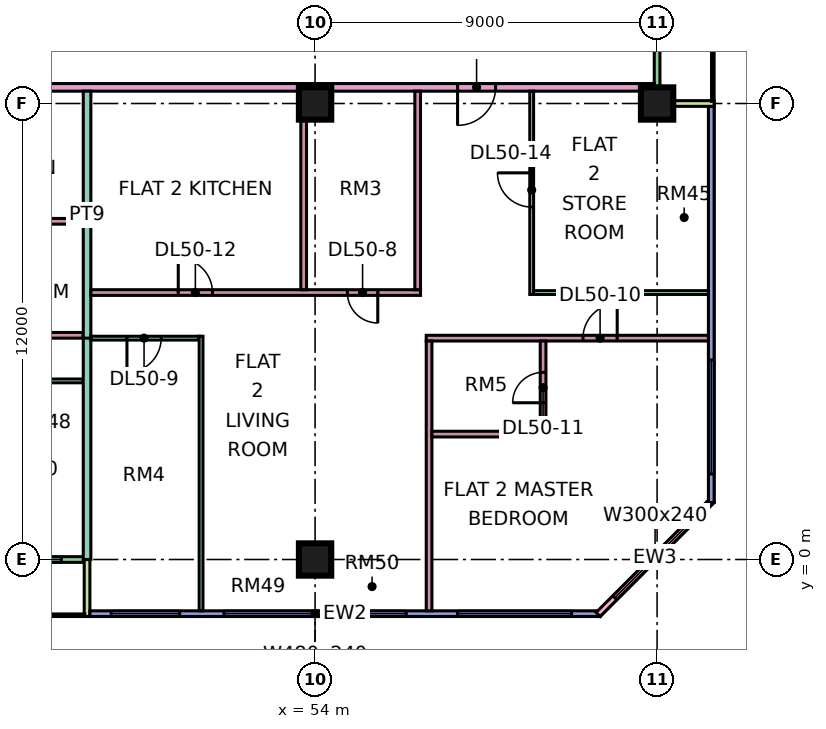
"""IFC4 building model, lengths in metres.
Left out: names, types, materials, properties, quantities, classifications, styles, units other than length and angle.
Written with IfcOpenShell. Run it as: python <this file> out.ifc"""

import sys

from ifc_helpers import new_model, si_unit, direction, frame, frame_2d, origin, origin_2d, place, context, subcontext, project, spatial, rectangle, extrude, element, fill, save


model = new_model("IFC4")
c1 = context("Model", 3, precision=1e-05, world=origin(), true_north=direction((0.0, 1.0)))
c2 = subcontext(c1, "Body", "Model", "MODEL_VIEW")
j1 = project(units=[si_unit("LENGTHUNIT", "METRE"), si_unit("PLANEANGLEUNIT", "RADIAN")], contexts=[c1])
p1 = place(None, origin())
s1 = spatial("IfcSite", under=j1, at=p1, CompositionType="ELEMENT")
p2 = place(p1, origin())
s2 = spatial("IfcBuilding", under=s1, at=p2, CompositionType="ELEMENT")
p3 = place(p2, frame((0.0, 0.0, 215.4)))
s3 = spatial("IfcBuildingStorey", under=s2, at=p3, CompositionType="ELEMENT", Elevation=215.4)
for number, where, z_axis, x_axis in (
    (1, (54.0, 0.0, 0.0), (0.0, 0.0, 1.0), (1.0, 0.0, 0.0)),
    (2, (54.0, 12.0, 0.0), (0.0, 0.0, 1.0), (1.0, 0.0, 0.0)),
    (3, (63.0, 12.0, 0.0), (0.0, 0.0, 1.0), (1.0, 0.0, 0.0)),
):
    element("IfcColumn", number, at=place(p3, frame(where, z_axis=z_axis, x_axis=x_axis)), inside=s3, PredefinedType="COLUMN", context=c2, shape_type="SweptSolid", body=[
        extrude(rectangle(XDim=0.85, YDim=0.85, at=origin_2d()), origin(), (0.0, 0.0, 1.0), 3.75),
    ])
p4 = place(p3, frame((36.075, 0.0, 0.0), z_axis=(0.0, 0.0, 1.0), x_axis=(1.0, 0.0, 0.0)))
e4 = element("IfcWall", 4, at=p4, inside=s3, PredefinedType="SOLIDWALL", context=c2, shape_type="SweptSolid", body=[
    extrude(rectangle(XDim=11.85, YDim=0.15, at=frame_2d((5.925, 0.0))), origin(), (0.0, 0.0, 1.0), 3.35),
])
p5 = place(p4, frame((3.525, 0.0, 0.0)))
e5 = element("IfcOpeningElement", 5, at=p5, cuts=e4, PredefinedType="OPENING", context=c2, shape_type="SweptSolid", body=[
    extrude(rectangle(XDim=1.8, YDim=2.4, at=frame_2d((0.9, 1.2))), frame((0.0, 0.085, 0.0), z_axis=(0.0, -1.0, 0.0), x_axis=(1.0, 0.0, 0.0)), (0.0, 0.0, 1.0), 0.17),
])
p6 = place(p4, frame((10.05, 0.0, 0.45)))
e6 = element("IfcOpeningElement", 6, at=p6, cuts=e4, PredefinedType="OPENING", context=c2, shape_type="SweptSolid", body=[
    extrude(rectangle(XDim=1.2, YDim=2.4, at=frame_2d((0.6, 1.2))), frame((0.0, 0.085, 0.0), z_axis=(0.0, -1.0, 0.0), x_axis=(1.0, 0.0, 0.0)), (0.0, 0.0, 1.0), 0.17),
])
p7 = place(p3, frame((48.0, -1.5, 0.0), z_axis=(0.0, 0.0, 1.0), x_axis=(0.0, 1.0, 0.0)))
e7 = element("IfcWall", 7, at=p7, inside=s3, PredefinedType="SOLIDWALL", context=c2, shape_type="SweptSolid", body=[
    extrude(rectangle(XDim=1.5, YDim=0.15, at=frame_2d((0.75, 0.0))), origin(), (0.0, 0.0, 1.0), 3.35),
])
p8 = place(p3, frame((48.075, -1.425, 0.0), z_axis=(0.0, 0.0, 1.0), x_axis=(1.0, 0.0, 0.0)))
e8 = element("IfcWall", 8, at=p8, inside=s3, PredefinedType="SOLIDWALL", context=c2, shape_type="SweptSolid", body=[
    extrude(rectangle(XDim=13.425, YDim=0.15, at=frame_2d((6.712, 0.0))), origin(), (0.0, 0.0, 1.0), 3.35),
])
p9 = place(p8, frame((0.562, 0.0, 0.45)))
e9 = element("IfcOpeningElement", 9, at=p9, cuts=e8, PredefinedType="OPENING", context=c2, shape_type="SweptSolid", body=[
    extrude(rectangle(XDim=1.8, YDim=2.4, at=frame_2d((0.9, 1.2))), frame((0.0, 0.085, 0.0), z_axis=(0.0, -1.0, 0.0), x_axis=(1.0, 0.0, 0.0)), (0.0, 0.0, 1.0), 0.17),
])
p10 = place(p8, frame((3.525, 0.0, 0.45)))
e10 = element("IfcOpeningElement", 10, at=p10, cuts=e8, PredefinedType="OPENING", context=c2, shape_type="SweptSolid", body=[
    extrude(rectangle(XDim=4.8, YDim=2.4, at=frame_2d((2.4, 1.2))), frame((0.0, 0.085, 0.0), z_axis=(0.0, -1.0, 0.0), x_axis=(1.0, 0.0, 0.0)), (0.0, 0.0, 1.0), 0.17),
])
p11 = place(p8, frame((9.675, 0.0, 0.45)))
e11 = element("IfcOpeningElement", 11, at=p11, cuts=e8, PredefinedType="OPENING", context=c2, shape_type="SweptSolid", body=[
    extrude(rectangle(XDim=3.0, YDim=2.4, at=frame_2d((1.5, 1.2))), frame((0.0, 0.085, 0.0), z_axis=(0.0, -1.0, 0.0), x_axis=(1.0, 0.0, 0.0)), (0.0, 0.0, 1.0), 0.17),
])
p12 = place(p3, frame((61.447, -1.447, 0.0), z_axis=(0.0, 0.0, 1.0), x_axis=(0.707106781187, 0.707106781187, 0.0)))
e12 = element("IfcWall", 12, at=p12, inside=s3, PredefinedType="SOLIDWALL", context=c2, shape_type="SweptSolid", body=[
    extrude(rectangle(XDim=4.243, YDim=0.15, at=frame_2d((2.121, 0.0))), origin(), (0.0, 0.0, 1.0), 3.35),
])
p13 = place(p12, frame((0.621, 0.0, 0.45)))
e13 = element("IfcOpeningElement", 13, at=p13, cuts=e12, PredefinedType="OPENING", context=c2, shape_type="SweptSolid", body=[
    extrude(rectangle(XDim=3.0, YDim=2.4, at=frame_2d((1.5, 1.2))), frame((0.0, 0.085, 0.0), z_axis=(0.0, -1.0, 0.0), x_axis=(1.0, 0.0, 0.0)), (0.0, 0.0, 1.0), 0.17),
])
p14 = place(p3, frame((64.425, 1.5, 0.0), z_axis=(0.0, 0.0, 1.0), x_axis=(0.0, 1.0, 0.0)))
e14 = element("IfcWall", 14, at=p14, inside=s3, PredefinedType="SOLIDWALL", context=c2, shape_type="SweptSolid", body=[
    extrude(rectangle(XDim=10.425, YDim=0.15, at=frame_2d((5.212, 0.0))), origin(), (0.0, 0.0, 1.0), 3.35),
])
p15 = place(p14, frame((0.75, 0.0, 0.45)))
e15 = element("IfcOpeningElement", 15, at=p15, cuts=e14, PredefinedType="OPENING", context=c2, shape_type="SweptSolid", body=[
    extrude(rectangle(XDim=3.0, YDim=2.4, at=frame_2d((1.5, 1.2))), frame((0.0, 0.085, 0.0), z_axis=(0.0, -1.0, 0.0), x_axis=(1.0, 0.0, 0.0)), (0.0, 0.0, 1.0), 0.17),
])
p16 = place(p3, frame((63.0, 12.075, 0.0), z_axis=(0.0, 0.0, 1.0), x_axis=(0.0, 1.0, 0.0)))
e16 = element("IfcWall", 16, at=p16, inside=s3, PredefinedType="SOLIDWALL", context=c2, shape_type="SweptSolid", body=[
    extrude(rectangle(XDim=10.35, YDim=0.15, at=frame_2d((5.175, 0.0))), origin(), (0.0, 0.0, 1.0), 3.35),
])
p17 = place(p16, frame((4.125, 0.0, 0.45)))
e17 = element("IfcOpeningElement", 17, at=p17, cuts=e16, PredefinedType="OPENING", context=c2, shape_type="SweptSolid", body=[
    extrude(rectangle(XDim=1.8, YDim=2.4, at=frame_2d((0.9, 1.2))), frame((0.0, 0.085, 0.0), z_axis=(0.0, -1.0, 0.0), x_axis=(1.0, 0.0, 0.0)), (0.0, 0.0, 1.0), 0.17),
])
p18 = place(p16, frame((7.538, 0.0, 0.0)))
e18 = element("IfcOpeningElement", 18, at=p18, cuts=e16, PredefinedType="OPENING", context=c2, shape_type="SweptSolid", body=[
    extrude(rectangle(XDim=1.8, YDim=2.4, at=frame_2d((0.9, 1.2))), frame((0.0, 0.085, 0.0), z_axis=(0.0, -1.0, 0.0), x_axis=(1.0, 0.0, 0.0)), (0.0, 0.0, 1.0), 0.17),
])
p19 = place(p3, frame((64.5, 12.0, 0.0), z_axis=(0.0, 0.0, 1.0), x_axis=(-1.0, 0.0, 0.0)))
e19 = element("IfcWall", 19, at=p19, inside=s3, PredefinedType="SOLIDWALL", context=c2, shape_type="SweptSolid", body=[
    extrude(rectangle(XDim=1.5, YDim=0.15, at=frame_2d((0.75, 0.0))), origin(), (0.0, 0.0, 1.0), 3.35),
])
p20 = place(p3, frame((33.05, 4.7, 0.0), z_axis=(0.0, 0.0, 1.0), x_axis=(1.0, 0.0, 0.0)))
e20 = element("IfcWall", 20, at=p20, inside=s3, PredefinedType="PARTITIONING", context=c2, shape_type="SweptSolid", body=[
    extrude(rectangle(XDim=14.85, YDim=0.1, at=frame_2d((7.425, 0.0))), origin(), (0.0, 0.0, 1.0), 3.35),
])
p21 = place(p20, frame((1.0, 0.0, 0.0)))
e21 = element("IfcOpeningElement", 21, at=p21, cuts=e20, PredefinedType="OPENING", context=c2, shape_type="SweptSolid", body=[
    extrude(rectangle(XDim=0.9, YDim=2.1, at=frame_2d((0.45, 1.05))), frame((0.0, 0.06, 0.0), z_axis=(0.0, -1.0, 0.0), x_axis=(1.0, 0.0, 0.0)), (0.0, 0.0, 1.0), 0.12),
])
p22 = place(p20, frame((13.0, 0.0, 0.0)))
e22 = element("IfcOpeningElement", 22, at=p22, cuts=e20, PredefinedType="OPENING", context=c2, shape_type="SweptSolid", body=[
    extrude(rectangle(XDim=0.9, YDim=2.1, at=frame_2d((0.45, 1.05))), frame((0.0, 0.06, 0.0), z_axis=(0.0, -1.0, 0.0), x_axis=(1.0, 0.0, 0.0)), (0.0, 0.0, 1.0), 0.12),
])
p23 = place(p20, frame((7.0, 0.0, 0.0)))
e23 = element("IfcOpeningElement", 23, at=p23, cuts=e20, PredefinedType="OPENING", context=c2, shape_type="SweptSolid", body=[
    extrude(rectangle(XDim=0.9, YDim=2.1, at=frame_2d((0.45, 1.05))), frame((0.0, 0.06, 0.0), z_axis=(0.0, -1.0, 0.0), x_axis=(1.0, 0.0, 0.0)), (0.0, 0.0, 1.0), 0.12),
])
p24 = place(p3, frame((40.65, 12.425, 0.0), z_axis=(0.0, 0.0, 1.0), x_axis=(1.0, 0.0, 0.0)))
e24 = element("IfcWall", 24, at=p24, inside=s3, PredefinedType="PARTITIONING", context=c2, shape_type="SweptSolid", body=[
    extrude(rectangle(XDim=22.276, YDim=0.2, at=frame_2d((11.138, 0.0))), origin(), (0.0, 0.0, 1.0), 3.35),
])
p25 = place(p24, frame((17.1, 0.0, 0.0)))
e25 = element("IfcOpeningElement", 25, at=p25, cuts=e24, PredefinedType="OPENING", context=c2, shape_type="SweptSolid", body=[
    extrude(rectangle(XDim=1.0, YDim=2.1, at=frame_2d((0.5, 1.05))), frame((0.0, 0.11, 0.0), z_axis=(0.0, -1.0, 0.0), x_axis=(1.0, 0.0, 0.0)), (0.0, 0.0, 1.0), 0.22),
])
p26 = place(p24, frame((1.05, 0.0, 0.0)))
e26 = element("IfcOpeningElement", 26, at=p26, cuts=e24, PredefinedType="OPENING", context=c2, shape_type="SweptSolid", body=[
    extrude(rectangle(XDim=1.0, YDim=2.1, at=frame_2d((0.5, 1.05))), frame((0.0, 0.11, 0.0), z_axis=(0.0, -1.0, 0.0), x_axis=(1.0, 0.0, 0.0)), (0.0, 0.0, 1.0), 0.22),
])
p27 = place(p3, frame((43.725, 5.9, 0.0), z_axis=(0.0, 0.0, 1.0), x_axis=(1.0, 0.0, 0.0)))
e27 = element("IfcWall", 27, at=p27, inside=s3, PredefinedType="PARTITIONING", context=c2, shape_type="SweptSolid", body=[
    extrude(rectangle(XDim=4.175, YDim=0.15, at=frame_2d((2.087, 0.0))), origin(), (0.0, 0.0, 1.0), 3.35),
])
p28 = place(p27, frame((1.675, 0.0, 0.0)))
e28 = element("IfcOpeningElement", 28, at=p28, cuts=e27, PredefinedType="OPENING", context=c2, shape_type="SweptSolid", body=[
    extrude(rectangle(XDim=0.8, YDim=2.1, at=frame_2d((0.4, 1.05))), frame((0.0, 0.085, 0.0), z_axis=(0.0, -1.0, 0.0), x_axis=(1.0, 0.0, 0.0)), (0.0, 0.0, 1.0), 0.17),
])
p29 = place(p3, frame((43.725, 8.9, 0.0), z_axis=(0.0, 0.0, 1.0), x_axis=(1.0, 0.0, 0.0)))
e29 = element("IfcWall", 29, at=p29, inside=s3, PredefinedType="PARTITIONING", context=c2, shape_type="SweptSolid", body=[
    extrude(rectangle(XDim=4.175, YDim=0.15, at=frame_2d((2.087, 0.0))), origin(), (0.0, 0.0, 1.0), 3.35),
])
p30 = place(p3, frame((48.0, 0.0, 0.0), z_axis=(0.0, 0.0, 1.0), x_axis=(0.0, 1.0, 0.0)))
e30 = element("IfcWall", 30, at=p30, inside=s3, PredefinedType="PARTITIONING", context=c2, shape_type="SweptSolid", body=[
    extrude(rectangle(XDim=5.875, YDim=0.2, at=frame_2d((2.938, 0.0))), origin(), (0.0, 0.0, 1.0), 3.35),
])
p31 = place(p3, frame((48.0, 5.825, 0.0), z_axis=(0.0, 0.0, 1.0), x_axis=(0.0, 1.0, 0.0)))
e31 = element("IfcWall", 31, at=p31, inside=s3, PredefinedType="PARTITIONING", context=c2, shape_type="SweptSolid", body=[
    extrude(rectangle(XDim=6.5, YDim=0.2, at=frame_2d((3.25, 0.0))), origin(), (0.0, 0.0, 1.0), 3.35),
])
p32 = place(p3, frame((48.1, 5.825, 0.0), z_axis=(0.0, 0.0, 1.0), x_axis=(1.0, 0.0, 0.0)))
e32 = element("IfcWall", 32, at=p32, inside=s3, PredefinedType="PARTITIONING", context=c2, shape_type="SweptSolid", body=[
    extrude(rectangle(XDim=2.85, YDim=0.1, at=frame_2d((1.425, 0.0))), origin(), (0.0, 0.0, 1.0), 3.35),
])
p33 = place(p32, frame((0.95, 0.0, 0.0)))
e33 = element("IfcOpeningElement", 33, at=p33, cuts=e32, PredefinedType="OPENING", context=c2, shape_type="SweptSolid", body=[
    extrude(rectangle(XDim=0.9, YDim=2.1, at=frame_2d((0.45, 1.05))), frame((0.0, 0.06, 0.0), z_axis=(0.0, -1.0, 0.0), x_axis=(1.0, 0.0, 0.0)), (0.0, 0.0, 1.0), 0.12),
])
p34 = place(p3, frame((48.1, 7.025, 0.0), z_axis=(0.0, 0.0, 1.0), x_axis=(1.0, 0.0, 0.0)))
e34 = element("IfcWall", 34, at=p34, inside=s3, PredefinedType="PARTITIONING", context=c2, shape_type="SweptSolid", body=[
    extrude(rectangle(XDim=8.675, YDim=0.15, at=frame_2d((4.337, 0.0))), origin(), (0.0, 0.0, 1.0), 3.35),
])
p35 = place(p34, frame((6.75, 0.0, 0.0)))
e35 = element("IfcOpeningElement", 35, at=p35, cuts=e34, PredefinedType="OPENING", context=c2, shape_type="SweptSolid", body=[
    extrude(rectangle(XDim=0.8, YDim=2.1, at=frame_2d((0.4, 1.05))), frame((0.0, 0.085, 0.0), z_axis=(0.0, -1.0, 0.0), x_axis=(1.0, 0.0, 0.0)), (0.0, 0.0, 1.0), 0.17),
])
p36 = place(p34, frame((2.3, 0.0, 0.0)))
e36 = element("IfcOpeningElement", 36, at=p36, cuts=e34, PredefinedType="OPENING", context=c2, shape_type="SweptSolid", body=[
    extrude(rectangle(XDim=0.9, YDim=2.1, at=frame_2d((0.45, 1.05))), frame((0.0, 0.085, 0.0), z_axis=(0.0, -1.0, 0.0), x_axis=(1.0, 0.0, 0.0)), (0.0, 0.0, 1.0), 0.17),
])
p37 = place(p3, frame((51.0, -1.35, 0.0), z_axis=(0.0, 0.0, 1.0), x_axis=(0.0, 1.0, 0.0)))
e37 = element("IfcWall", 37, at=p37, inside=s3, PredefinedType="PARTITIONING", context=c2, shape_type="SweptSolid", body=[
    extrude(rectangle(XDim=7.225, YDim=0.1, at=frame_2d((3.613, 0.0))), origin(), (0.0, 0.0, 1.0), 3.35),
])
for number, where, z_axis, x_axis in (
    (38, (53.7, 7.1, 0.0), (0.0, 0.0, 1.0), (0.0, 1.0, 0.0)),
    (39, (56.7, 7.1, 0.0), (0.0, 0.0, 1.0), (0.0, 1.0, 0.0)),
):
    element("IfcWall", number, at=place(p3, frame(where, z_axis=z_axis, x_axis=x_axis)), inside=s3, PredefinedType="PARTITIONING", context=c2, shape_type="SweptSolid", body=[
        extrude(rectangle(XDim=5.225, YDim=0.15, at=frame_2d((2.612, 0.0))), origin(), (0.0, 0.0, 1.0), 3.35),
    ])
p38 = place(p3, frame((56.925, 5.825, 0.0), z_axis=(0.0, 0.0, 1.0), x_axis=(1.0, 0.0, 0.0)))
e40 = element("IfcWall", 40, at=p38, inside=s3, PredefinedType="PARTITIONING", context=c2, shape_type="SweptSolid", body=[
    extrude(rectangle(XDim=7.425, YDim=0.15, at=frame_2d((3.712, 0.0))), origin(), (0.0, 0.0, 1.0), 3.35),
])
p39 = place(p38, frame((4.125, 0.0, 0.0)))
e41 = element("IfcOpeningElement", 41, at=p39, cuts=e40, PredefinedType="OPENING", context=c2, shape_type="SweptSolid", body=[
    extrude(rectangle(XDim=0.9, YDim=2.1, at=frame_2d((0.45, 1.05))), frame((0.0, 0.085, 0.0), z_axis=(0.0, -1.0, 0.0), x_axis=(1.0, 0.0, 0.0)), (0.0, 0.0, 1.0), 0.17),
])
p40 = place(p3, frame((57.0, -1.35, 0.0), z_axis=(0.0, 0.0, 1.0), x_axis=(0.0, 1.0, 0.0)))
e42 = element("IfcWall", 42, at=p40, inside=s3, PredefinedType="PARTITIONING", context=c2, shape_type="SweptSolid", body=[
    extrude(rectangle(XDim=7.1, YDim=0.15, at=frame_2d((3.55, 0.0))), origin(), (0.0, 0.0, 1.0), 3.35),
])
p41 = place(p3, frame((57.075, 3.3, 0.0), z_axis=(0.0, 0.0, 1.0), x_axis=(1.0, 0.0, 0.0)))
e43 = element("IfcWall", 43, at=p41, inside=s3, PredefinedType="PARTITIONING", context=c2, shape_type="SweptSolid", body=[
    extrude(rectangle(XDim=3.0, YDim=0.15, at=frame_2d((1.5, 0.0))), origin(), (0.0, 0.0, 1.0), 3.35),
])
p42 = place(p3, frame((59.7, 6.975, 0.0), z_axis=(0.0, 0.0, 1.0), x_axis=(0.0, 1.0, 0.0)))
e44 = element("IfcWall", 44, at=p42, inside=s3, PredefinedType="PARTITIONING", context=c2, shape_type="SweptSolid", body=[
    extrude(rectangle(XDim=5.35, YDim=0.1, at=frame_2d((2.675, 0.0))), origin(), (0.0, 0.0, 1.0), 3.35),
])
p43 = place(p42, frame((2.3, 0.0, 0.0)))
e45 = element("IfcOpeningElement", 45, at=p43, cuts=e44, PredefinedType="OPENING", context=c2, shape_type="SweptSolid", body=[
    extrude(rectangle(XDim=0.9, YDim=2.1, at=frame_2d((0.45, 1.05))), frame((0.0, 0.06, 0.0), z_axis=(0.0, -1.0, 0.0), x_axis=(1.0, 0.0, 0.0)), (0.0, 0.0, 1.0), 0.12),
])
p44 = place(p3, frame((59.75, 7.025, 0.0), z_axis=(0.0, 0.0, 1.0), x_axis=(1.0, 0.0, 0.0)))
e46 = element("IfcWall", 46, at=p44, inside=s3, PredefinedType="PARTITIONING", context=c2, shape_type="SweptSolid", body=[
    extrude(rectangle(XDim=4.6, YDim=0.1, at=frame_2d((2.3, 0.0))), origin(), (0.0, 0.0, 1.0), 3.35),
])
p45 = place(p3, frame((60.0, 3.375, 0.0), z_axis=(0.0, 0.0, 1.0), x_axis=(0.0, 1.0, 0.0)))
e47 = element("IfcWall", 47, at=p45, inside=s3, PredefinedType="PARTITIONING", context=c2, shape_type="SweptSolid", body=[
    extrude(rectangle(XDim=2.375, YDim=0.15, at=frame_2d((1.188, 0.0))), origin(), (0.0, 0.0, 1.0), 3.35),
])
p46 = place(p45, frame((0.75, 0.0, 0.0)))
e48 = element("IfcOpeningElement", 48, at=p46, cuts=e47, PredefinedType="OPENING", context=c2, shape_type="SweptSolid", body=[
    extrude(rectangle(XDim=0.8, YDim=2.1, at=frame_2d((0.4, 1.05))), frame((0.0, 0.085, 0.0), z_axis=(0.0, -1.0, 0.0), x_axis=(1.0, 0.0, 0.0)), (0.0, 0.0, 1.0), 0.17),
])
p47 = place(p6, origin())
e49 = element("IfcWindow", 49, at=p47, inside=s3, PartitioningType="SINGLE_PANEL", PredefinedType="WINDOW", context=c2, shape_type="SweptSolid", body=[
    extrude(rectangle(XDim=1.2, YDim=2.4, at=frame_2d((0.6, 1.2))), frame((0.0, 0.03, 0.0), z_axis=(0.0, -1.0, 0.0), x_axis=(1.0, 0.0, 0.0)), (0.0, 0.0, 1.0), 0.06),
])
fill(e6, e49)
p48 = place(p9, origin())
e50 = element("IfcWindow", 50, at=p48, inside=s3, PartitioningType="SINGLE_PANEL", PredefinedType="WINDOW", context=c2, shape_type="SweptSolid", body=[
    extrude(rectangle(XDim=1.8, YDim=2.4, at=frame_2d((0.9, 1.2))), frame((0.0, 0.03, 0.0), z_axis=(0.0, -1.0, 0.0), x_axis=(1.0, 0.0, 0.0)), (0.0, 0.0, 1.0), 0.06),
])
fill(e9, e50)
p49 = place(p10, origin())
e51 = element("IfcWindow", 51, at=p49, inside=s3, PartitioningType="SINGLE_PANEL", PredefinedType="WINDOW", context=c2, shape_type="SweptSolid", body=[
    extrude(rectangle(XDim=4.8, YDim=2.4, at=frame_2d((2.4, 1.2))), frame((0.0, 0.03, 0.0), z_axis=(0.0, -1.0, 0.0), x_axis=(1.0, 0.0, 0.0)), (0.0, 0.0, 1.0), 0.06),
])
fill(e10, e51)
p50 = place(p11, origin())
e52 = element("IfcWindow", 52, at=p50, inside=s3, PartitioningType="SINGLE_PANEL", PredefinedType="WINDOW", context=c2, shape_type="SweptSolid", body=[
    extrude(rectangle(XDim=3.0, YDim=2.4, at=frame_2d((1.5, 1.2))), frame((0.0, 0.03, 0.0), z_axis=(0.0, -1.0, 0.0), x_axis=(1.0, 0.0, 0.0)), (0.0, 0.0, 1.0), 0.06),
])
fill(e11, e52)
p51 = place(p13, origin())
e53 = element("IfcWindow", 53, at=p51, inside=s3, PartitioningType="SINGLE_PANEL", PredefinedType="WINDOW", context=c2, shape_type="SweptSolid", body=[
    extrude(rectangle(XDim=3.0, YDim=2.4, at=frame_2d((1.5, 1.2))), frame((0.0, 0.03, 0.0), z_axis=(0.0, -1.0, 0.0), x_axis=(1.0, 0.0, 0.0)), (0.0, 0.0, 1.0), 0.06),
])
fill(e13, e53)
p52 = place(p15, origin())
e54 = element("IfcWindow", 54, at=p52, inside=s3, PartitioningType="SINGLE_PANEL", PredefinedType="WINDOW", context=c2, shape_type="SweptSolid", body=[
    extrude(rectangle(XDim=3.0, YDim=2.4, at=frame_2d((1.5, 1.2))), frame((0.0, 0.03, 0.0), z_axis=(0.0, -1.0, 0.0), x_axis=(1.0, 0.0, 0.0)), (0.0, 0.0, 1.0), 0.06),
])
fill(e15, e54)
p53 = place(p35, origin())
e55 = element("IfcDoor", 55, at=p53, inside=s3, OperationType="SINGLE_SWING_RIGHT", PredefinedType="DOOR", context=c2, shape_type="SweptSolid", body=[
    extrude(rectangle(XDim=0.8, YDim=2.1, at=frame_2d((0.4, 1.05))), frame((0.0, 0.025, 0.0), z_axis=(0.0, -1.0, 0.0), x_axis=(1.0, 0.0, 0.0)), (0.0, 0.0, 1.0), 0.05),
])
fill(e35, e55)
p54 = place(p33, frame((0.9, 0.0, 0.0), z_axis=(0.0, 0.0, 1.0), x_axis=(-1.0, 0.0, 0.0)))
e56 = element("IfcDoor", 56, at=p54, inside=s3, OperationType="SINGLE_SWING_LEFT", PredefinedType="DOOR", context=c2, shape_type="SweptSolid", body=[
    extrude(rectangle(XDim=0.9, YDim=2.1, at=frame_2d((0.45, 1.05))), frame((0.0, 0.025, 0.0), z_axis=(0.0, -1.0, 0.0), x_axis=(1.0, 0.0, 0.0)), (0.0, 0.0, 1.0), 0.05),
])
fill(e33, e56)
p55 = place(p39, frame((0.9, 0.0, 0.0), z_axis=(0.0, 0.0, 1.0), x_axis=(-1.0, 0.0, 0.0)))
e57 = element("IfcDoor", 57, at=p55, inside=s3, OperationType="SINGLE_SWING_RIGHT", PredefinedType="DOOR", context=c2, shape_type="SweptSolid", body=[
    extrude(rectangle(XDim=0.9, YDim=2.1, at=frame_2d((0.45, 1.05))), frame((0.0, 0.025, 0.0), z_axis=(0.0, -1.0, 0.0), x_axis=(1.0, 0.0, 0.0)), (0.0, 0.0, 1.0), 0.05),
])
fill(e41, e57)
p56 = place(p46, origin())
e58 = element("IfcDoor", 58, at=p56, inside=s3, OperationType="SINGLE_SWING_LEFT", PredefinedType="DOOR", context=c2, shape_type="SweptSolid", body=[
    extrude(rectangle(XDim=0.8, YDim=2.1, at=frame_2d((0.4, 1.05))), frame((0.0, 0.025, 0.0), z_axis=(0.0, -1.0, 0.0), x_axis=(1.0, 0.0, 0.0)), (0.0, 0.0, 1.0), 0.05),
])
fill(e48, e58)
p57 = place(p36, origin())
e59 = element("IfcDoor", 59, at=p57, inside=s3, OperationType="SINGLE_SWING_LEFT", PredefinedType="DOOR", context=c2, shape_type="SweptSolid", body=[
    extrude(rectangle(XDim=0.9, YDim=2.1, at=frame_2d((0.45, 1.05))), frame((0.0, 0.025, 0.0), z_axis=(0.0, -1.0, 0.0), x_axis=(1.0, 0.0, 0.0)), (0.0, 0.0, 1.0), 0.05),
])
fill(e36, e59)
p58 = place(p25, frame((1.0, 0.0, 0.0), z_axis=(0.0, 0.0, 1.0), x_axis=(-1.0, 0.0, 0.0)))
e60 = element("IfcDoor", 60, at=p58, inside=s3, OperationType="SINGLE_SWING_LEFT", PredefinedType="DOOR", context=c2, shape_type="SweptSolid", body=[
    extrude(rectangle(XDim=1.0, YDim=2.1, at=frame_2d((0.5, 1.05))), frame((0.0, 0.025, 0.0), z_axis=(0.0, -1.0, 0.0), x_axis=(1.0, 0.0, 0.0)), (0.0, 0.0, 1.0), 0.05),
])
fill(e25, e60)
p59 = place(p43, frame((0.9, 0.0, 0.0), z_axis=(0.0, 0.0, 1.0), x_axis=(-1.0, 0.0, 0.0)))
e61 = element("IfcDoor", 61, at=p59, inside=s3, OperationType="SINGLE_SWING_RIGHT", PredefinedType="DOOR", context=c2, shape_type="SweptSolid", body=[
    extrude(rectangle(XDim=0.9, YDim=2.1, at=frame_2d((0.45, 1.05))), frame((0.0, 0.025, 0.0), z_axis=(0.0, -1.0, 0.0), x_axis=(1.0, 0.0, 0.0)), (0.0, 0.0, 1.0), 0.05),
])
fill(e45, e61)
save(model, sys.argv[1])
